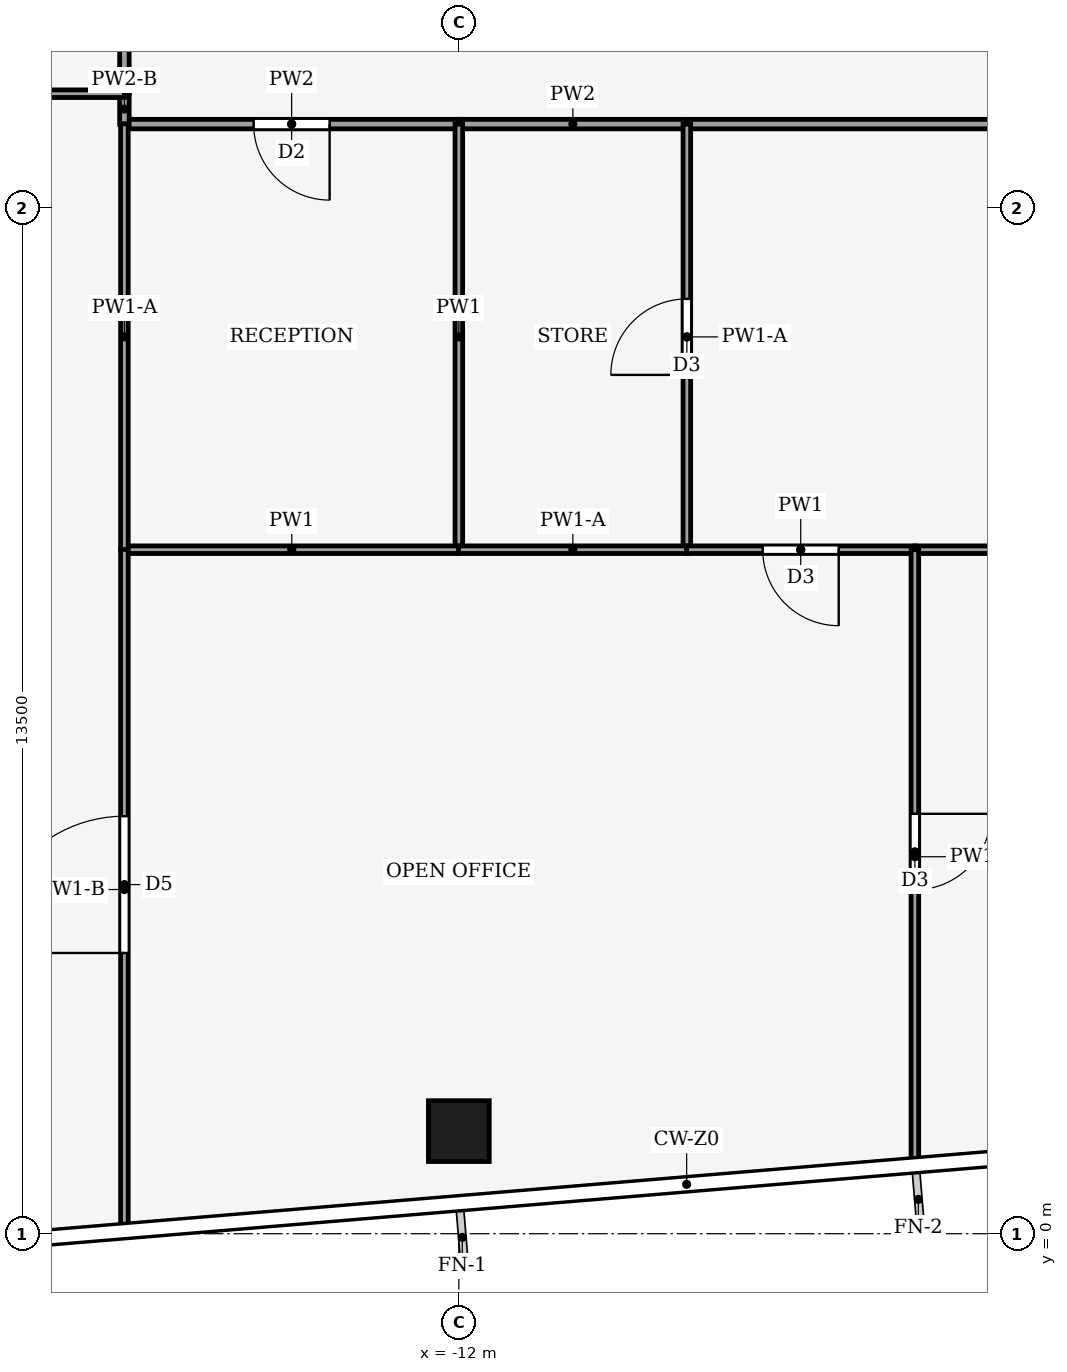
"""IFC4 building model, lengths in metres.
Left out: names, types, materials, properties, quantities, classifications, styles, units other than length and angle.
Written with IfcOpenShell. Run it as: python <this file> out.ifc"""

import sys

from ifc_helpers import new_model, si_unit, direction, frame, frame_2d, origin, origin_2d, place, context, subcontext, project, spatial, rectangle, hollow_rectangle, extrude, element, fill, save


model = new_model("IFC4")
c1 = context("Model", 3, precision=1e-05, world=origin(), true_north=direction((0.0, 1.0)))
c2 = subcontext(c1, "Body", "Model", "MODEL_VIEW")
j1 = project(units=[si_unit("LENGTHUNIT", "METRE"), si_unit("PLANEANGLEUNIT", "RADIAN")], contexts=[c1])
p1 = place(None, origin())
s1 = spatial("IfcSite", under=j1, at=p1, CompositionType="ELEMENT")
p2 = place(p1, origin())
s2 = spatial("IfcBuilding", under=s1, at=p2, CompositionType="ELEMENT")
p3 = place(p2, frame((0.0, 0.0, 9.0)))
s3 = spatial("IfcBuildingStorey", under=s2, at=p3, CompositionType="ELEMENT", Elevation=9.0)
p4 = place(p3, frame((-12.0, 1.35, 0.0), z_axis=(0.0, 0.0, 1.0), x_axis=(1.0, 0.0, 0.0)))
e1 = element("IfcColumn", 1, at=p4, inside=s3, PredefinedType="COLUMN", context=c2, shape_type="SweptSolid", body=[
    extrude(hollow_rectangle(XDim=0.8, YDim=0.8, WallThickness=0.04, at=origin_2d()), origin(), (0.0, 0.0, 1.0), 5.0),
])
p5 = place(p3, frame((-12.0, 14.6, 0.0), z_axis=(0.0, 0.0, 1.0), x_axis=(-1.0, 0.0, 0.0)))
e2 = element("IfcWall", 2, at=p5, inside=s3, PredefinedType="PARTITIONING", context=c2, shape_type="SweptSolid", body=[
    extrude(rectangle(XDim=4.4, YDim=0.125, at=frame_2d((2.2, 0.0))), origin(), (0.0, 0.0, 1.0), 4.29),
])
p6 = place(p5, frame((1.7, 0.0, 0.0)))
e3 = element("IfcOpeningElement", 3, at=p6, cuts=e2, PredefinedType="OPENING", context=c2, shape_type="SweptSolid", body=[
    extrude(rectangle(XDim=1.0, YDim=2.1, at=frame_2d((0.5, 1.05))), frame((0.0, 0.073, 0.0), z_axis=(0.0, -1.0, 0.0), x_axis=(1.0, 0.0, 0.0)), (0.0, 0.0, 1.0), 0.145),
])
p7 = place(p3, frame((-12.0, 14.6, 0.0), z_axis=(0.0, 0.0, 1.0), x_axis=(1.0, 0.0, 0.0)))
e4 = element("IfcWall", 4, at=p7, inside=s3, PredefinedType="PARTITIONING", context=c2, shape_type="SweptSolid", body=[
    extrude(rectangle(XDim=3.0, YDim=0.125, at=frame_2d((1.5, 0.0))), origin(), (0.0, 0.0, 1.0), 4.29),
])
p8 = place(p3, frame((-9.0, 14.6, 0.0), z_axis=(0.0, 0.0, 1.0), x_axis=(1.0, 0.0, 0.0)))
e5 = element("IfcWall", 5, at=p8, inside=s3, PredefinedType="PARTITIONING", context=c2, shape_type="SweptSolid", body=[
    extrude(rectangle(XDim=15.0, YDim=0.125, at=frame_2d((7.5, 0.0))), origin(), (0.0, 0.0, 1.0), 4.29),
])
p9 = place(p8, frame((6.6, 0.0, 0.0)))
e6 = element("IfcOpeningElement", 6, at=p9, cuts=e5, PredefinedType="OPENING", context=c2, shape_type="SweptSolid", body=[
    extrude(rectangle(XDim=1.8, YDim=2.1, at=frame_2d((0.9, 1.05))), frame((0.0, 0.073, 0.0), z_axis=(0.0, -1.0, 0.0), x_axis=(1.0, 0.0, 0.0)), (0.0, 0.0, 1.0), 0.145),
])
p10 = place(p3, frame((-16.4, 15.0, 0.0), z_axis=(0.0, 0.0, 1.0), x_axis=(0.0, -1.0, 0.0)))
e7 = element("IfcWall", 7, at=p10, inside=s3, PredefinedType="PARTITIONING", context=c2, shape_type="SweptSolid", body=[
    extrude(rectangle(XDim=0.404, YDim=0.125, at=frame_2d((0.202, 0.0))), origin(), (0.0, 0.0, 1.0), 4.87),
])
p11 = place(p3, frame((-16.4, 15.0, 0.0), z_axis=(0.0, 0.0, 1.0), x_axis=(0.0, 1.0, 0.0)))
e8 = element("IfcWall", 8, at=p11, inside=s3, PredefinedType="PARTITIONING", context=c2, shape_type="SweptSolid", body=[
    extrude(rectangle(XDim=3.0, YDim=0.125, at=frame_2d((1.5, 0.0))), origin(), (0.0, 0.0, 1.0), 4.14),
])
p12 = place(p11, frame((1.45, 0.0, 0.0)))
e9 = element("IfcOpeningElement", 9, at=p12, cuts=e8, PredefinedType="OPENING", context=c2, shape_type="SweptSolid", body=[
    extrude(rectangle(XDim=0.9, YDim=2.1, at=frame_2d((0.45, 1.05))), frame((0.0, 0.073, 0.0), z_axis=(0.0, -1.0, 0.0), x_axis=(1.0, 0.0, 0.0)), (0.0, 0.0, 1.0), 0.145),
])
p13 = place(p3, frame((-12.0, 9.0, 0.0), z_axis=(0.0, 0.0, 1.0), x_axis=(0.0, 1.0, 0.0)))
e10 = element("IfcWall", 10, at=p13, inside=s3, PredefinedType="PARTITIONING", context=c2, shape_type="SweptSolid", body=[
    extrude(rectangle(XDim=5.6, YDim=0.1, at=frame_2d((2.8, 0.0))), origin(), (0.0, 0.0, 1.0), 4.29),
])
p14 = place(p3, frame((-16.4, 9.0, 0.0), z_axis=(0.0, 0.0, 1.0), x_axis=(1.0, 0.0, 0.0)))
e11 = element("IfcWall", 11, at=p14, inside=s3, PredefinedType="PARTITIONING", context=c2, shape_type="SweptSolid", body=[
    extrude(rectangle(XDim=4.404, YDim=0.1, at=frame_2d((2.202, 0.0))), origin(), (0.0, 0.0, 1.0), 4.29),
])
p15 = place(p3, frame((-16.4, 14.604, 0.0), z_axis=(0.0, 0.0, 1.0), x_axis=(0.0, -1.0, 0.0)))
e12 = element("IfcWall", 12, at=p15, inside=s3, PredefinedType="PARTITIONING", context=c2, shape_type="SweptSolid", body=[
    extrude(rectangle(XDim=5.608, YDim=0.1, at=frame_2d((2.804, 0.0))), origin(), (0.0, 0.0, 1.0), 4.87),
])
p16 = place(p3, frame((-9.0, 9.0, 0.0), z_axis=(0.0, 0.0, 1.0), x_axis=(0.0, 1.0, 0.0)))
e13 = element("IfcWall", 13, at=p16, inside=s3, PredefinedType="PARTITIONING", context=c2, shape_type="SweptSolid", body=[
    extrude(rectangle(XDim=5.6, YDim=0.1, at=frame_2d((2.8, 0.0))), origin(), (0.0, 0.0, 1.0), 4.87),
])
p17 = place(p16, frame((2.3, 0.0, 0.0)))
e14 = element("IfcOpeningElement", 14, at=p17, cuts=e13, PredefinedType="OPENING", context=c2, shape_type="SweptSolid", body=[
    extrude(rectangle(XDim=1.0, YDim=2.1, at=frame_2d((0.5, 1.05))), frame((0.0, 0.06, 0.0), z_axis=(0.0, -1.0, 0.0), x_axis=(1.0, 0.0, 0.0)), (0.0, 0.0, 1.0), 0.12),
])
p18 = place(p3, frame((-12.004, 9.0, 0.0), z_axis=(0.0, 0.0, 1.0), x_axis=(1.0, 0.0, 0.0)))
e15 = element("IfcWall", 15, at=p18, inside=s3, PredefinedType="PARTITIONING", context=c2, shape_type="SweptSolid", body=[
    extrude(rectangle(XDim=3.008, YDim=0.1, at=frame_2d((1.504, 0.0))), origin(), (0.0, 0.0, 1.0), 4.87),
])
p19 = place(p3, frame((-6.0, 9.0, 0.0), z_axis=(0.0, 0.0, 1.0), x_axis=(-1.0, 0.0, 0.0)))
e16 = element("IfcWall", 16, at=p19, inside=s3, PredefinedType="PARTITIONING", context=c2, shape_type="SweptSolid", body=[
    extrude(rectangle(XDim=3.004, YDim=0.1, at=frame_2d((1.502, 0.0))), origin(), (0.0, 0.0, 1.0), 4.29),
])
p20 = place(p19, frame((1.002, 0.0, 0.0)))
e17 = element("IfcOpeningElement", 17, at=p20, cuts=e16, PredefinedType="OPENING", context=c2, shape_type="SweptSolid", body=[
    extrude(rectangle(XDim=1.0, YDim=2.1, at=frame_2d((0.5, 1.05))), frame((0.0, 0.06, 0.0), z_axis=(0.0, -1.0, 0.0), x_axis=(1.0, 0.0, 0.0)), (0.0, 0.0, 1.0), 0.12),
])
p21 = place(p3, frame((-6.0, 9.0, 0.0), z_axis=(0.0, 0.0, 1.0), x_axis=(1.0, 0.0, 0.0)))
e18 = element("IfcWall", 18, at=p21, inside=s3, PredefinedType="PARTITIONING", context=c2, shape_type="SweptSolid", body=[
    extrude(rectangle(XDim=6.0, YDim=0.1, at=frame_2d((3.0, 0.0))), origin(), (0.0, 0.0, 1.0), 4.29),
])
p22 = place(p3, frame((-6.0, 9.0, 0.0), z_axis=(0.0, 0.0, 1.0), x_axis=(0.0, -1.0, 0.0)))
e19 = element("IfcWall", 19, at=p22, inside=s3, PredefinedType="PARTITIONING", context=c2, shape_type="SweptSolid", body=[
    extrude(rectangle(XDim=8.08, YDim=0.1, at=frame_2d((4.04, 0.0))), origin(), (0.0, 0.0, 1.0), 4.04),
])
p23 = place(p22, frame((3.475, 0.0, 0.0)))
e20 = element("IfcOpeningElement", 20, at=p23, cuts=e19, PredefinedType="OPENING", context=c2, shape_type="SweptSolid", body=[
    extrude(rectangle(XDim=1.0, YDim=2.1, at=frame_2d((0.5, 1.05))), frame((0.0, 0.06, 0.0), z_axis=(0.0, -1.0, 0.0), x_axis=(1.0, 0.0, 0.0)), (0.0, 0.0, 1.0), 0.12),
])
p24 = place(p3, frame((-16.4, 0.053, 0.0), z_axis=(0.0, 0.0, 1.0), x_axis=(0.0, 1.0, 0.0)))
e21 = element("IfcWall", 21, at=p24, inside=s3, PredefinedType="PARTITIONING", context=c2, shape_type="SweptSolid", body=[
    extrude(rectangle(XDim=8.951, YDim=0.1, at=frame_2d((4.475, 0.0))), origin(), (0.0, 0.0, 1.0), 4.04),
])
p25 = place(p24, frame((3.64, 0.0, 0.0)))
e22 = element("IfcOpeningElement", 22, at=p25, cuts=e21, PredefinedType="OPENING", context=c2, shape_type="SweptSolid", body=[
    extrude(rectangle(XDim=1.8, YDim=2.1, at=frame_2d((0.9, 1.05))), frame((0.0, 0.06, 0.0), z_axis=(0.0, -1.0, 0.0), x_axis=(1.0, 0.0, 0.0)), (0.0, 0.0, 1.0), 0.12),
])
p26 = place(p3, frame((-16.4, 15.0, 0.0), z_axis=(0.0, 0.0, 1.0), x_axis=(-1.0, 0.0, 0.0)))
e23 = element("IfcWall", 23, at=p26, inside=s3, PredefinedType="PARTITIONING", context=c2, shape_type="SweptSolid", body=[
    extrude(rectangle(XDim=6.862, YDim=0.1, at=frame_2d((3.431, 0.0))), origin(), (0.0, 0.0, 1.0), 4.04),
])
p27 = place(p6, origin())
e24 = element("IfcDoor", 24, at=p27, inside=s3, OperationType="SINGLE_SWING_LEFT", PredefinedType="DOOR", context=c2, shape_type="SweptSolid", body=[
    extrude(rectangle(XDim=1.0, YDim=2.1, at=frame_2d((0.5, 1.05))), frame((0.0, 0.025, 0.0), z_axis=(0.0, -1.0, 0.0), x_axis=(1.0, 0.0, 0.0)), (0.0, 0.0, 1.0), 0.05),
])
fill(e3, e24)
p28 = place(p17, origin())
e25 = element("IfcDoor", 25, at=p28, inside=s3, OperationType="SINGLE_SWING_RIGHT", PredefinedType="DOOR", context=c2, shape_type="SweptSolid", body=[
    extrude(rectangle(XDim=1.0, YDim=2.1, at=frame_2d((0.5, 1.05))), frame((0.0, 0.025, 0.0), z_axis=(0.0, -1.0, 0.0), x_axis=(1.0, 0.0, 0.0)), (0.0, 0.0, 1.0), 0.05),
])
fill(e14, e25)
p29 = place(p20, origin())
e26 = element("IfcDoor", 26, at=p29, inside=s3, OperationType="SINGLE_SWING_LEFT", PredefinedType="DOOR", context=c2, shape_type="SweptSolid", body=[
    extrude(rectangle(XDim=1.0, YDim=2.1, at=frame_2d((0.5, 1.05))), frame((0.0, 0.025, 0.0), z_axis=(0.0, -1.0, 0.0), x_axis=(1.0, 0.0, 0.0)), (0.0, 0.0, 1.0), 0.05),
])
fill(e17, e26)
p30 = place(p23, origin())
e27 = element("IfcDoor", 27, at=p30, inside=s3, OperationType="SINGLE_SWING_LEFT", PredefinedType="DOOR", context=c2, shape_type="SweptSolid", body=[
    extrude(rectangle(XDim=1.0, YDim=2.1, at=frame_2d((0.5, 1.05))), frame((0.0, 0.025, 0.0), z_axis=(0.0, -1.0, 0.0), x_axis=(1.0, 0.0, 0.0)), (0.0, 0.0, 1.0), 0.05),
])
fill(e20, e27)
p31 = place(p25, origin())
e28 = element("IfcDoor", 28, at=p31, inside=s3, OperationType="DOUBLE_DOOR_SINGLE_SWING", PredefinedType="DOOR", context=c2, shape_type="SweptSolid", body=[
    extrude(rectangle(XDim=1.8, YDim=2.1, at=frame_2d((0.9, 1.05))), frame((0.0, 0.025, 0.0), z_axis=(0.0, -1.0, 0.0), x_axis=(1.0, 0.0, 0.0)), (0.0, 0.0, 1.0), 0.05),
])
fill(e22, e28)
save(model, sys.argv[1])
